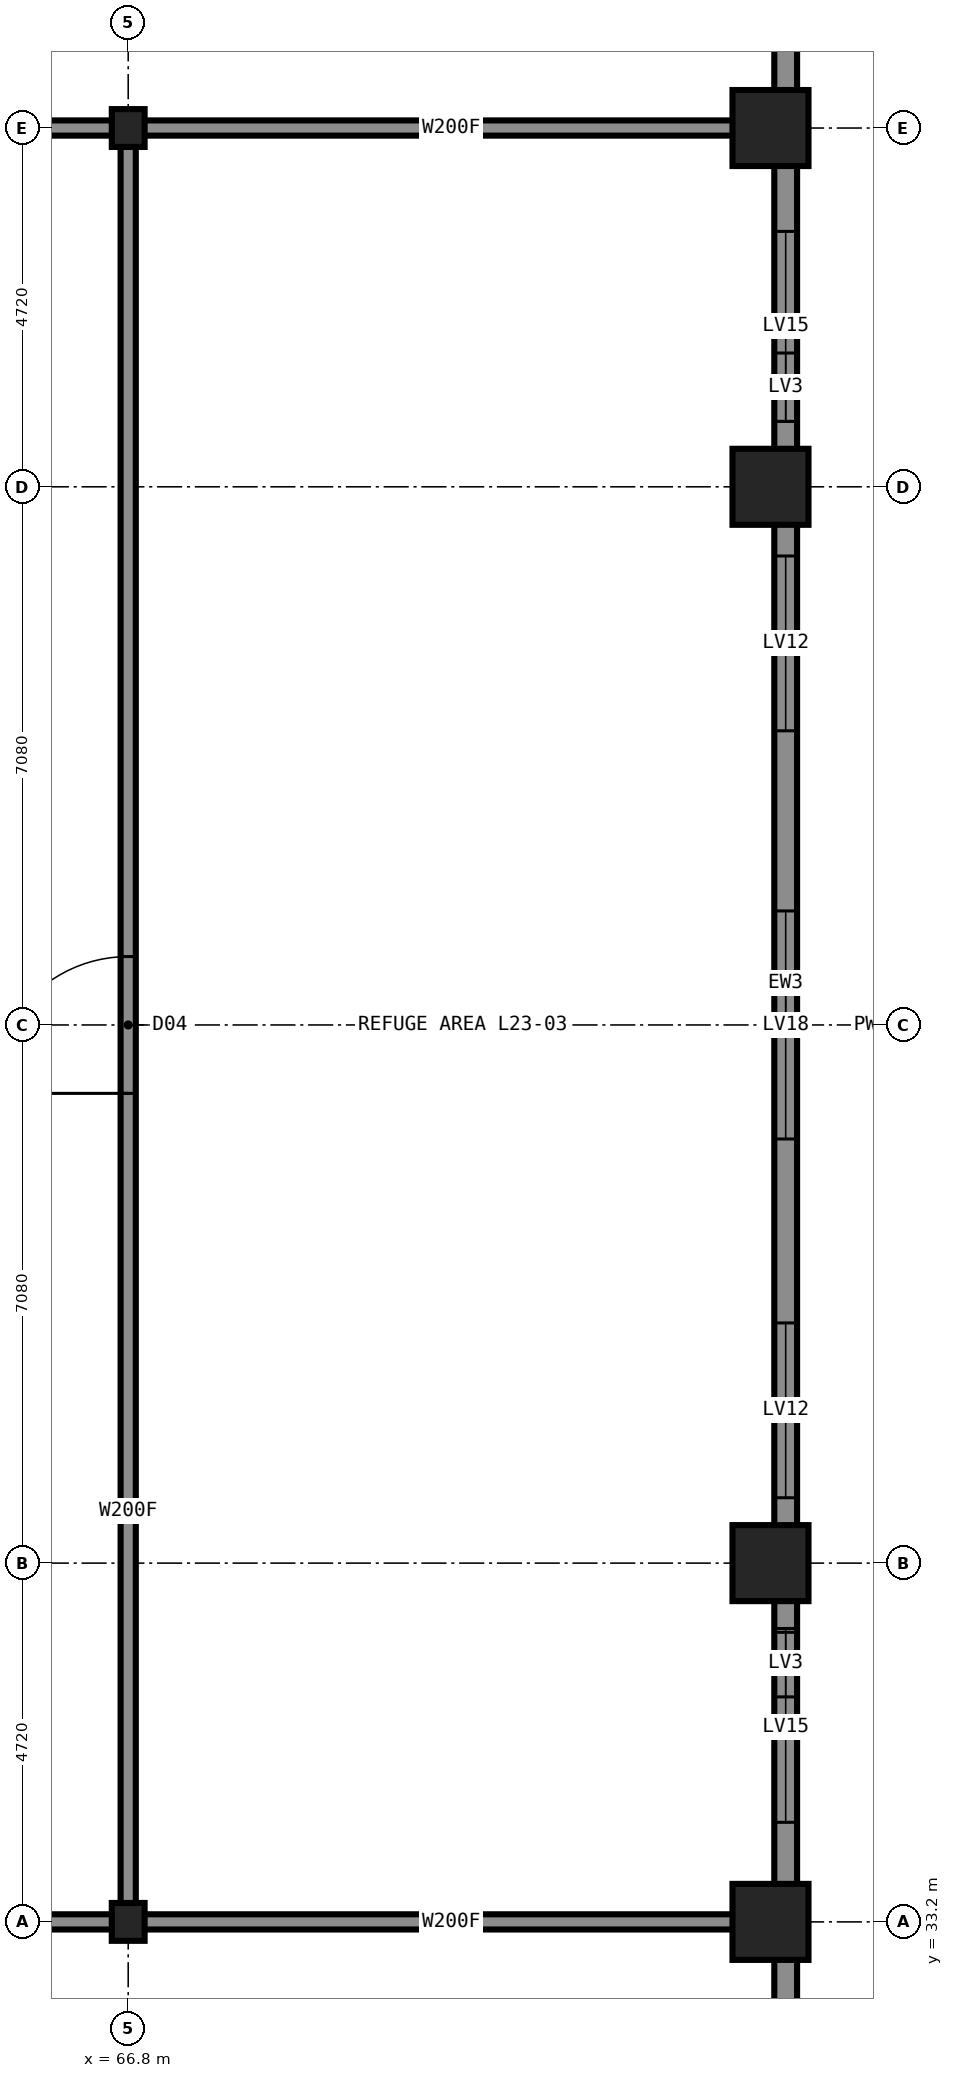
"""IFC4 building model, lengths in metres.
Left out: names, types, materials, properties, quantities, classifications, styles, units other than length and angle.
Written with IfcOpenShell. Run it as: python <this file> out.ifc"""

import sys

from ifc_helpers import new_model, si_unit, direction, frame, frame_2d, origin, origin_2d, place, context, subcontext, project, spatial, rectangle, hollow_rectangle, i_section, extrude, element, fill, save


model = new_model("IFC4")
c1 = context("Model", 3, precision=1e-05, world=origin(), true_north=direction((0.0, 1.0)))
c2 = subcontext(c1, "Body", "Model", "MODEL_VIEW")
j1 = project(units=[si_unit("LENGTHUNIT", "METRE"), si_unit("PLANEANGLEUNIT", "RADIAN")], contexts=[c1])
p1 = place(None, origin())
s1 = spatial("IfcSite", under=j1, at=p1, CompositionType="ELEMENT")
p2 = place(p1, origin())
s2 = spatial("IfcBuilding", under=s1, at=p2, CompositionType="ELEMENT")
p3 = place(p2, frame((0.0, 0.0, 88.0)))
s3 = spatial("IfcBuildingStorey", under=s2, at=p3, CompositionType="ELEMENT", Elevation=88.0)
for number, where, z_axis, x_axis in (
    (1, (75.25, 33.2, 0.0), (0.0, 0.0, 1.0), (1.0, 0.0, 0.0)),
    (2, (75.25, 37.92, 0.0), (0.0, 0.0, 1.0), (1.0, 0.0, 0.0)),
    (3, (75.25, 52.08, 0.0), (0.0, 0.0, 1.0), (1.0, 0.0, 0.0)),
    (4, (75.25, 56.8, 0.0), (0.0, 0.0, 1.0), (1.0, 0.0, 0.0)),
):
    element("IfcColumn", number, at=place(p3, frame(where, z_axis=z_axis, x_axis=x_axis)), inside=s3, PredefinedType="COLUMN", context=c2, shape_type="SweptSolid", body=[
        extrude(hollow_rectangle(XDim=1.0, YDim=1.0, WallThickness=0.06, at=origin_2d()), origin(), (0.0, 0.0, 1.0), 5.4),
    ])
for number, where, z_axis, x_axis in (
    (5, (66.8, 33.2, 0.0), (0.0, 0.0, 1.0), (1.0, 0.0, 0.0)),
    (6, (66.8, 56.8, 0.0), (0.0, 0.0, 1.0), (1.0, 0.0, 0.0)),
):
    element("IfcColumn", number, at=place(p3, frame(where, z_axis=z_axis, x_axis=x_axis)), inside=s3, PredefinedType="COLUMN", context=c2, shape_type="SweptSolid", body=[
        extrude(i_section(OverallWidth=0.432, OverallDepth=0.498, WebThickness=0.056, FlangeThickness=0.089, at=origin_2d()), origin(), (0.0, 0.0, 1.0), 5.4),
    ])
p4 = place(p3, frame((43.2, 33.2, 0.0), z_axis=(0.0, 0.0, 1.0), x_axis=(1.0, 0.0, 0.0)))
e7 = element("IfcWall", 7, at=p4, inside=s3, PredefinedType="PARTITIONING", context=c2, shape_type="SweptSolid", body=[
    extrude(rectangle(XDim=23.6, YDim=0.2, at=frame_2d((11.8, 0.0))), origin(), (0.0, 0.0, 1.0), 5.23),
])
p5 = place(p4, frame((5.3, 0.0, 0.0)))
e8 = element("IfcOpeningElement", 8, at=p5, cuts=e7, PredefinedType="OPENING", context=c2, shape_type="SweptSolid", body=[
    extrude(rectangle(XDim=1.0, YDim=2.1, at=frame_2d((0.5, 1.05))), frame((0.0, 0.11, 0.0), z_axis=(0.0, -1.0, 0.0), x_axis=(1.0, 0.0, 0.0)), (0.0, 0.0, 1.0), 0.22),
])
p6 = place(p3, frame((66.8, 33.2, 0.0), z_axis=(0.0, 0.0, 1.0), x_axis=(1.0, 0.0, 0.0)))
e9 = element("IfcWall", 9, at=p6, inside=s3, PredefinedType="PARTITIONING", context=c2, shape_type="SweptSolid", body=[
    extrude(rectangle(XDim=8.5, YDim=0.2, at=frame_2d((4.25, 0.0))), origin(), (0.0, 0.0, 1.0), 4.473),
])
p7 = place(p3, frame((43.2, 56.8, 0.0), z_axis=(0.0, 0.0, 1.0), x_axis=(1.0, 0.0, 0.0)))
e10 = element("IfcWall", 10, at=p7, inside=s3, PredefinedType="PARTITIONING", context=c2, shape_type="SweptSolid", body=[
    extrude(rectangle(XDim=23.6, YDim=0.2, at=frame_2d((11.8, 0.0))), origin(), (0.0, 0.0, 1.0), 5.23),
])
p8 = place(p7, frame((5.3, 0.0, 0.0)))
e11 = element("IfcOpeningElement", 11, at=p8, cuts=e10, PredefinedType="OPENING", context=c2, shape_type="SweptSolid", body=[
    extrude(rectangle(XDim=1.0, YDim=2.1, at=frame_2d((0.5, 1.05))), frame((0.0, 0.11, 0.0), z_axis=(0.0, -1.0, 0.0), x_axis=(1.0, 0.0, 0.0)), (0.0, 0.0, 1.0), 0.22),
])
p9 = place(p3, frame((66.8, 56.8, 0.0), z_axis=(0.0, 0.0, 1.0), x_axis=(1.0, 0.0, 0.0)))
e12 = element("IfcWall", 12, at=p9, inside=s3, PredefinedType="PARTITIONING", context=c2, shape_type="SweptSolid", body=[
    extrude(rectangle(XDim=8.5, YDim=0.2, at=frame_2d((4.25, 0.0))), origin(), (0.0, 0.0, 1.0), 4.473),
])
p10 = place(p3, frame((66.8, 33.2, 0.0), z_axis=(0.0, 0.0, 1.0), x_axis=(0.0, 1.0, 0.0)))
e13 = element("IfcWall", 13, at=p10, inside=s3, PredefinedType="PARTITIONING", context=c2, shape_type="SweptSolid", body=[
    extrude(rectangle(XDim=23.6, YDim=0.2, at=frame_2d((11.8, 0.0))), origin(), (0.0, 0.0, 1.0), 5.23),
])
p11 = place(p10, frame((10.9, 0.0, 0.0)))
e14 = element("IfcOpeningElement", 14, at=p11, cuts=e13, PredefinedType="OPENING", context=c2, shape_type="SweptSolid", body=[
    extrude(rectangle(XDim=1.8, YDim=2.2, at=frame_2d((0.9, 1.1))), frame((0.0, 0.11, 0.0), z_axis=(0.0, -1.0, 0.0), x_axis=(1.0, 0.0, 0.0)), (0.0, 0.0, 1.0), 0.22),
])
p12 = place(p3, frame((75.45, 29.9, 0.0), z_axis=(0.0, 0.0, 1.0), x_axis=(0.0, 1.0, 0.0)))
e15 = element("IfcWall", 15, at=p12, inside=s3, PredefinedType="SOLIDWALL", context=c2, shape_type="SweptSolid", body=[
    extrude(rectangle(XDim=30.2, YDim=0.3, at=frame_2d((15.1, 0.0))), origin(), (0.0, 0.0, 1.0), 4.43),
])
p13 = place(p12, frame((4.61, 0.0, 2.15)))
e16 = element("IfcOpeningElement", 16, at=p13, cuts=e15, PredefinedType="OPENING", context=c2, shape_type="SweptSolid", body=[
    extrude(rectangle(XDim=2.5, YDim=1.6, at=frame_2d((1.25, 0.8))), frame((0.0, 0.16, 0.0), z_axis=(0.0, -1.0, 0.0), x_axis=(1.0, 0.0, 0.0)), (0.0, 0.0, 1.0), 0.32),
])
p14 = place(p12, frame((8.88, 0.0, 2.3)))
e17 = element("IfcOpeningElement", 17, at=p14, cuts=e15, PredefinedType="OPENING", context=c2, shape_type="SweptSolid", body=[
    extrude(rectangle(XDim=2.3, YDim=1.5, at=frame_2d((1.15, 0.75))), frame((0.0, 0.16, 0.0), z_axis=(0.0, -1.0, 0.0), x_axis=(1.0, 0.0, 0.0)), (0.0, 0.0, 1.0), 0.32),
])
p15 = place(p12, frame((13.6, 0.0, 0.6)))
e18 = element("IfcOpeningElement", 18, at=p15, cuts=e15, PredefinedType="OPENING", context=c2, shape_type="SweptSolid", body=[
    extrude(rectangle(XDim=3.0, YDim=2.2, at=frame_2d((1.5, 1.1))), frame((0.0, 0.16, 0.0), z_axis=(0.0, -1.0, 0.0), x_axis=(1.0, 0.0, 0.0)), (0.0, 0.0, 1.0), 0.32),
])
p16 = place(p12, frame((18.97, 0.0, 2.3)))
e19 = element("IfcOpeningElement", 19, at=p16, cuts=e15, PredefinedType="OPENING", context=c2, shape_type="SweptSolid", body=[
    extrude(rectangle(XDim=2.3, YDim=1.5, at=frame_2d((1.15, 0.75))), frame((0.0, 0.16, 0.0), z_axis=(0.0, -1.0, 0.0), x_axis=(1.0, 0.0, 0.0)), (0.0, 0.0, 1.0), 0.32),
])
p17 = place(p12, frame((23.04, 0.0, 2.15)))
e20 = element("IfcOpeningElement", 20, at=p17, cuts=e15, PredefinedType="OPENING", context=c2, shape_type="SweptSolid", body=[
    extrude(rectangle(XDim=2.5, YDim=1.6, at=frame_2d((1.25, 0.8))), frame((0.0, 0.16, 0.0), z_axis=(0.0, -1.0, 0.0), x_axis=(1.0, 0.0, 0.0)), (0.0, 0.0, 1.0), 0.32),
])
p18 = place(p12, frame((6.26, 0.0, 0.6)))
e21 = element("IfcOpeningElement", 21, at=p18, cuts=e15, PredefinedType="OPENING", context=c2, shape_type="SweptSolid", body=[
    extrude(rectangle(XDim=0.9, YDim=1.5, at=frame_2d((0.45, 0.75))), frame((0.0, 0.16, 0.0), z_axis=(0.0, -1.0, 0.0), x_axis=(1.0, 0.0, 0.0)), (0.0, 0.0, 1.0), 0.32),
])
p19 = place(p12, frame((23.04, 0.0, 0.6)))
e22 = element("IfcOpeningElement", 22, at=p19, cuts=e15, PredefinedType="OPENING", context=c2, shape_type="SweptSolid", body=[
    extrude(rectangle(XDim=0.9, YDim=1.5, at=frame_2d((0.45, 0.75))), frame((0.0, 0.16, 0.0), z_axis=(0.0, -1.0, 0.0), x_axis=(1.0, 0.0, 0.0)), (0.0, 0.0, 1.0), 0.32),
])
p20 = place(p11, origin())
e23 = element("IfcDoor", 23, at=p20, inside=s3, OperationType="DOUBLE_DOOR_SINGLE_SWING", PredefinedType="DOOR", context=c2, shape_type="SweptSolid", body=[
    extrude(rectangle(XDim=1.8, YDim=2.2, at=frame_2d((0.9, 1.1))), frame((0.0, 0.025, 0.0), z_axis=(0.0, -1.0, 0.0), x_axis=(1.0, 0.0, 0.0)), (0.0, 0.0, 1.0), 0.05),
])
fill(e14, e23)
p21 = place(p13, origin())
e24 = element("IfcWindow", 24, at=p21, inside=s3, PartitioningType="SINGLE_PANEL", PredefinedType="USERDEFINED", context=c2, shape_type="SweptSolid", body=[
    extrude(rectangle(XDim=2.5, YDim=1.6, at=frame_2d((1.25, 0.8))), frame((0.0, 0.03, 0.0), z_axis=(0.0, -1.0, 0.0), x_axis=(1.0, 0.0, 0.0)), (0.0, 0.0, 1.0), 0.06),
])
fill(e16, e24)
p22 = place(p14, origin())
e25 = element("IfcWindow", 25, at=p22, inside=s3, PartitioningType="SINGLE_PANEL", PredefinedType="USERDEFINED", context=c2, shape_type="SweptSolid", body=[
    extrude(rectangle(XDim=2.3, YDim=1.5, at=frame_2d((1.15, 0.75))), frame((0.0, 0.03, 0.0), z_axis=(0.0, -1.0, 0.0), x_axis=(1.0, 0.0, 0.0)), (0.0, 0.0, 1.0), 0.06),
])
fill(e17, e25)
p23 = place(p15, origin())
e26 = element("IfcWindow", 26, at=p23, inside=s3, PartitioningType="SINGLE_PANEL", PredefinedType="USERDEFINED", context=c2, shape_type="SweptSolid", body=[
    extrude(rectangle(XDim=3.0, YDim=2.2, at=frame_2d((1.5, 1.1))), frame((0.0, 0.03, 0.0), z_axis=(0.0, -1.0, 0.0), x_axis=(1.0, 0.0, 0.0)), (0.0, 0.0, 1.0), 0.06),
])
fill(e18, e26)
p24 = place(p16, origin())
e27 = element("IfcWindow", 27, at=p24, inside=s3, PartitioningType="SINGLE_PANEL", PredefinedType="USERDEFINED", context=c2, shape_type="SweptSolid", body=[
    extrude(rectangle(XDim=2.3, YDim=1.5, at=frame_2d((1.15, 0.75))), frame((0.0, 0.03, 0.0), z_axis=(0.0, -1.0, 0.0), x_axis=(1.0, 0.0, 0.0)), (0.0, 0.0, 1.0), 0.06),
])
fill(e19, e27)
p25 = place(p17, origin())
e28 = element("IfcWindow", 28, at=p25, inside=s3, PartitioningType="SINGLE_PANEL", PredefinedType="USERDEFINED", context=c2, shape_type="SweptSolid", body=[
    extrude(rectangle(XDim=2.5, YDim=1.6, at=frame_2d((1.25, 0.8))), frame((0.0, 0.03, 0.0), z_axis=(0.0, -1.0, 0.0), x_axis=(1.0, 0.0, 0.0)), (0.0, 0.0, 1.0), 0.06),
])
fill(e20, e28)
p26 = place(p18, origin())
e29 = element("IfcWindow", 29, at=p26, inside=s3, PartitioningType="SINGLE_PANEL", PredefinedType="USERDEFINED", context=c2, shape_type="SweptSolid", body=[
    extrude(rectangle(XDim=0.9, YDim=1.5, at=frame_2d((0.45, 0.75))), frame((0.0, 0.03, 0.0), z_axis=(0.0, -1.0, 0.0), x_axis=(1.0, 0.0, 0.0)), (0.0, 0.0, 1.0), 0.06),
])
fill(e21, e29)
p27 = place(p19, origin())
e30 = element("IfcWindow", 30, at=p27, inside=s3, PartitioningType="SINGLE_PANEL", PredefinedType="USERDEFINED", context=c2, shape_type="SweptSolid", body=[
    extrude(rectangle(XDim=0.9, YDim=1.5, at=frame_2d((0.45, 0.75))), frame((0.0, 0.03, 0.0), z_axis=(0.0, -1.0, 0.0), x_axis=(1.0, 0.0, 0.0)), (0.0, 0.0, 1.0), 0.06),
])
fill(e22, e30)
save(model, sys.argv[1])
